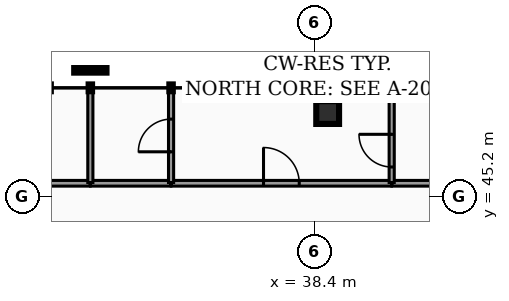
"""IFC4 building model, lengths in metres.
Left out: names, types, materials, properties, quantities, classifications, styles, units other than length and angle.
Written with IfcOpenShell. Run it as: python <this file> out.ifc"""

import sys

from ifc_helpers import new_model, si_unit, direction, frame, frame_2d, origin, origin_2d, place, context, subcontext, project, spatial, rectangle, hollow_rectangle, extrude, element, fill, save


model = new_model("IFC4")
c1 = context("Model", 3, precision=1e-05, world=origin(), true_north=direction((0.0, 1.0)))
c2 = subcontext(c1, "Body", "Model", "MODEL_VIEW")
j1 = project(units=[si_unit("LENGTHUNIT", "METRE"), si_unit("PLANEANGLEUNIT", "RADIAN")], contexts=[c1])
p1 = place(None, origin())
s1 = spatial("IfcSite", under=j1, at=p1, CompositionType="ELEMENT")
p2 = place(p1, origin())
s2 = spatial("IfcBuilding", under=s1, at=p2, CompositionType="ELEMENT")
p3 = place(p2, frame((0.0, 0.0, 242.76)))
s3 = spatial("IfcBuildingStorey", under=s2, at=p3, CompositionType="ELEMENT", Elevation=242.76)
p4 = place(p3, frame((38.745, 47.411, 0.0), z_axis=(0.0, 0.0, 1.0), x_axis=(1.0, 0.0, 0.0)))
e1 = element("IfcColumn", 1, at=p4, inside=s3, PredefinedType="COLUMN", context=c2, shape_type="SweptSolid", body=[
    extrude(hollow_rectangle(XDim=0.6, YDim=0.6, WallThickness=0.03, at=origin_2d()), origin(), (0.0, 0.0, 1.0), 3.18),
])
p5 = place(p3, frame((28.55, 45.55, 0.0), z_axis=(0.0, 0.0, 1.0), x_axis=(1.0, 0.0, 0.0)))
e2 = element("IfcWall", 2, at=p5, inside=s3, PredefinedType="PARTITIONING", context=c2, shape_type="SweptSolid", body=[
    extrude(rectangle(XDim=3.945, YDim=0.15, at=frame_2d((1.973, 0.0))), origin(), (0.0, 0.0, 1.0), 2.235),
])
p6 = place(p3, frame((34.629, 45.55, 0.0), z_axis=(0.0, 0.0, 1.0), x_axis=(1.0, 0.0, 0.0)))
e3 = element("IfcWall", 3, at=p6, inside=s3, PredefinedType="PARTITIONING", context=c2, shape_type="SweptSolid", body=[
    extrude(rectangle(XDim=5.796, YDim=0.15, at=frame_2d((2.898, 0.0))), origin(), (0.0, 0.0, 1.0), 2.235),
])
p7 = place(p6, frame((2.428, 0.0, 0.0)))
e4 = element("IfcOpeningElement", 4, at=p7, cuts=e3, PredefinedType="OPENING", context=c2, shape_type="SweptSolid", body=[
    extrude(rectangle(XDim=0.94, YDim=2.05, at=frame_2d((0.47, 1.025))), frame((0.0, 0.085, 0.0), z_axis=(0.0, -1.0, 0.0), x_axis=(1.0, 0.0, 0.0)), (0.0, 0.0, 1.0), 0.17),
])
p8 = place(p3, frame((40.435, 45.55, 0.0), z_axis=(0.0, 0.0, 1.0), x_axis=(1.0, 0.0, 0.0)))
e5 = element("IfcWall", 5, at=p8, inside=s3, PredefinedType="PARTITIONING", context=c2, shape_type="SweptSolid", body=[
    extrude(rectangle(XDim=3.86, YDim=0.15, at=frame_2d((1.93, 0.0))), origin(), (0.0, 0.0, 1.0), 2.235),
])
p9 = place(p3, frame((32.505, 45.55, 0.0), z_axis=(0.0, 0.0, 1.0), x_axis=(1.0, 0.0, 0.0)))
e6 = element("IfcWall", 6, at=p9, inside=s3, PredefinedType="PARTITIONING", context=c2, shape_type="SweptSolid", body=[
    extrude(rectangle(XDim=2.114, YDim=0.15, at=frame_2d((1.057, 0.0))), origin(), (0.0, 0.0, 1.0), 2.235),
])
p10 = place(p3, frame((32.5, 45.57, 0.0), z_axis=(0.0, 0.0, 1.0), x_axis=(0.0, 1.0, 0.0)))
e7 = element("IfcWall", 7, at=p10, inside=s3, PredefinedType="PARTITIONING", context=c2, shape_type="SweptSolid", body=[
    extrude(rectangle(XDim=2.476, YDim=0.135, at=frame_2d((1.238, 0.0))), origin(), (0.0, 0.0, 1.0), 2.235),
])
p11 = place(p3, frame((40.43, 45.57, 0.0), z_axis=(0.0, 0.0, 1.0), x_axis=(0.0, 1.0, 0.0)))
e8 = element("IfcWall", 8, at=p11, inside=s3, PredefinedType="PARTITIONING", context=c2, shape_type="SweptSolid", body=[
    extrude(rectangle(XDim=2.476, YDim=0.135, at=frame_2d((1.238, 0.0))), origin(), (0.0, 0.0, 1.0), 2.235),
])
p12 = place(p11, frame((0.408, 0.0, 0.0)))
e9 = element("IfcOpeningElement", 9, at=p12, cuts=e8, PredefinedType="OPENING", context=c2, shape_type="SweptSolid", body=[
    extrude(rectangle(XDim=0.86, YDim=2.05, at=frame_2d((0.43, 1.025))), frame((0.0, 0.077, 0.0), z_axis=(0.0, -1.0, 0.0), x_axis=(1.0, 0.0, 0.0)), (0.0, 0.0, 1.0), 0.155),
])
p13 = place(p3, frame((34.624, 45.57, 0.0), z_axis=(0.0, 0.0, 1.0), x_axis=(0.0, 1.0, 0.0)))
e10 = element("IfcWall", 10, at=p13, inside=s3, PredefinedType="PARTITIONING", context=c2, shape_type="SweptSolid", body=[
    extrude(rectangle(XDim=2.476, YDim=0.135, at=frame_2d((1.238, 0.0))), origin(), (0.0, 0.0, 1.0), 2.235),
])
p14 = place(p13, frame((0.808, 0.0, 0.0)))
e11 = element("IfcOpeningElement", 11, at=p14, cuts=e10, PredefinedType="OPENING", context=c2, shape_type="SweptSolid", body=[
    extrude(rectangle(XDim=0.86, YDim=2.05, at=frame_2d((0.43, 1.025))), frame((0.0, 0.077, 0.0), z_axis=(0.0, -1.0, 0.0), x_axis=(1.0, 0.0, 0.0)), (0.0, 0.0, 1.0), 0.155),
])
p15 = place(p7, origin())
e12 = element("IfcDoor", 12, at=p15, inside=s3, OperationType="SINGLE_SWING_LEFT", PredefinedType="DOOR", context=c2, shape_type="SweptSolid", body=[
    extrude(rectangle(XDim=0.94, YDim=2.05, at=frame_2d((0.47, 1.025))), frame((0.0, 0.025, 0.0), z_axis=(0.0, -1.0, 0.0), x_axis=(1.0, 0.0, 0.0)), (0.0, 0.0, 1.0), 0.05),
])
fill(e4, e12)
p16 = place(p12, origin())
e13 = element("IfcDoor", 13, at=p16, inside=s3, OperationType="SINGLE_SWING_RIGHT", PredefinedType="DOOR", context=c2, shape_type="SweptSolid", body=[
    extrude(rectangle(XDim=0.86, YDim=2.05, at=frame_2d((0.43, 1.025))), frame((0.0, 0.025, 0.0), z_axis=(0.0, -1.0, 0.0), x_axis=(1.0, 0.0, 0.0)), (0.0, 0.0, 1.0), 0.05),
])
fill(e9, e13)
p17 = place(p14, origin())
e14 = element("IfcDoor", 14, at=p17, inside=s3, OperationType="SINGLE_SWING_LEFT", PredefinedType="DOOR", context=c2, shape_type="SweptSolid", body=[
    extrude(rectangle(XDim=0.86, YDim=2.05, at=frame_2d((0.43, 1.025))), frame((0.0, 0.025, 0.0), z_axis=(0.0, -1.0, 0.0), x_axis=(1.0, 0.0, 0.0)), (0.0, 0.0, 1.0), 0.05),
])
fill(e11, e14)
save(model, sys.argv[1])
